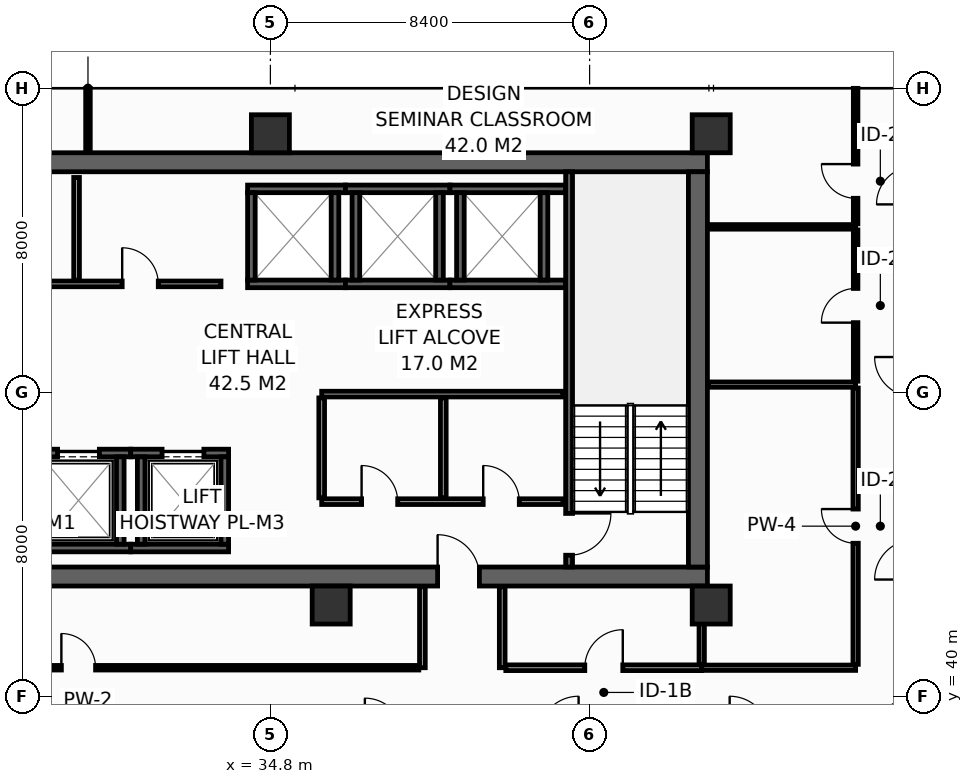
"""IFC4 building model, lengths in metres.
Left out: names, types, materials, properties, quantities, classifications, styles, units other than length and angle.
Written with IfcOpenShell. Run it as: python <this file> out.ifc"""

import sys

from ifc_helpers import new_model, si_unit, direction, frame, frame_2d, origin, origin_2d, place, context, subcontext, project, spatial, rectangle, hollow_rectangle, extrude, element, fill, save


model = new_model("IFC4")
c1 = context("Model", 3, precision=1e-05, world=origin(), true_north=direction((0.0, 1.0)))
c2 = subcontext(c1, "Body", "Model", "MODEL_VIEW")
j1 = project(units=[si_unit("LENGTHUNIT", "METRE"), si_unit("PLANEANGLEUNIT", "RADIAN")], contexts=[c1])
p1 = place(None, origin())
s1 = spatial("IfcSite", under=j1, at=p1, CompositionType="ELEMENT")
p2 = place(p1, origin())
s2 = spatial("IfcBuilding", under=s1, at=p2, CompositionType="ELEMENT")
p3 = place(p2, frame((0.0, 0.0, 167.6)))
s3 = spatial("IfcBuildingStorey", under=s2, at=p3, CompositionType="ELEMENT", Elevation=167.6)
p4 = place(p3, frame((13.6, 43.15, 0.0), z_axis=(0.0, 0.0, 1.0), x_axis=(1.0, 0.0, 0.0)))
e1 = element("IfcWall", 1, at=p4, inside=s3, PredefinedType="SHEAR", context=c2, shape_type="SweptSolid", body=[
    extrude(rectangle(XDim=32.7, YDim=0.5, at=frame_2d((16.35, 0.0))), origin(), (0.0, 0.0, 1.0), 3.55),
])
p5 = place(p4, frame((5.4, 0.0, 0.0)))
e2 = element("IfcOpeningElement", 2, at=p5, cuts=e1, PredefinedType="OPENING", context=c2, shape_type="SweptSolid", body=[
    extrude(rectangle(XDim=1.1, YDim=2.15, at=frame_2d((0.55, 1.075))), frame((0.0, 0.26, 0.0), z_axis=(0.0, -1.0, 0.0), x_axis=(1.0, 0.0, 0.0)), (0.0, 0.0, 1.0), 0.52),
])
p6 = place(p4, frame((25.6, 0.0, 0.0)))
e3 = element("IfcOpeningElement", 3, at=p6, cuts=e1, PredefinedType="OPENING", context=c2, shape_type="SweptSolid", body=[
    extrude(rectangle(XDim=1.1, YDim=2.15, at=frame_2d((0.55, 1.075))), frame((0.0, 0.26, 0.0), z_axis=(0.0, -1.0, 0.0), x_axis=(1.0, 0.0, 0.0)), (0.0, 0.0, 1.0), 0.52),
])
p7 = place(p3, frame((13.6, 54.05, 0.0), z_axis=(0.0, 0.0, 1.0), x_axis=(1.0, 0.0, 0.0)))
e4 = element("IfcWall", 4, at=p7, inside=s3, PredefinedType="SHEAR", context=c2, shape_type="SweptSolid", body=[
    extrude(rectangle(XDim=32.7, YDim=0.5, at=frame_2d((16.35, 0.0))), origin(), (0.0, 0.0, 1.0), 3.55),
])
p8 = place(p3, frame((46.05, 43.4, 0.0), z_axis=(0.0, 0.0, 1.0), x_axis=(0.0, 1.0, 0.0)))
e5 = element("IfcWall", 5, at=p8, inside=s3, PredefinedType="SHEAR", context=c2, shape_type="SweptSolid", body=[
    extrude(rectangle(XDim=10.4, YDim=0.5, at=frame_2d((5.2, 0.0))), origin(), (0.0, 0.0, 1.0), 3.55),
])
for number, where, z_axis, x_axis in (
    (6, (34.8, 54.8, 0.0), (0.0, 0.0, 1.0), (1.0, 0.0, 0.0)),
    (7, (46.4, 54.8, 0.0), (0.0, 0.0, 1.0), (1.0, 0.0, 0.0)),
    (8, (36.4, 42.4, 0.0), (0.0, 0.0, 1.0), (1.0, 0.0, 0.0)),
    (9, (46.4, 42.4, 0.0), (0.0, 0.0, 1.0), (1.0, 0.0, 0.0)),
):
    element("IfcColumn", number, at=place(p3, frame(where, z_axis=z_axis, x_axis=x_axis)), inside=s3, PredefinedType="COLUMN", context=c2, shape_type="SweptSolid", body=[
        extrude(hollow_rectangle(XDim=1.0, YDim=1.0, WallThickness=0.045, at=origin_2d()), origin(), (0.0, 0.0, 1.0), 3.8),
    ])
p9 = place(p3, frame((28.375, 43.9, 0.0), z_axis=(0.0, 0.0, 1.0), x_axis=(1.0, 0.0, 0.0)))
e10 = element("IfcWall", 10, at=p9, inside=s3, PredefinedType="SHEAR", context=c2, shape_type="SweptSolid", body=[
    extrude(rectangle(XDim=2.75, YDim=0.2, at=frame_2d((1.375, 0.0))), origin(), (0.0, 0.0, 1.0), 3.55),
])
p10 = place(p3, frame((28.375, 46.4, 0.0), z_axis=(0.0, 0.0, 1.0), x_axis=(1.0, 0.0, 0.0)))
e11 = element("IfcWall", 11, at=p10, inside=s3, PredefinedType="SHEAR", context=c2, shape_type="SweptSolid", body=[
    extrude(rectangle(XDim=2.75, YDim=0.2, at=frame_2d((1.375, 0.0))), origin(), (0.0, 0.0, 1.0), 3.55),
])
p11 = place(p10, frame((0.825, 0.0, 0.0)))
e12 = element("IfcOpeningElement", 12, at=p11, cuts=e11, PredefinedType="OPENING", context=c2, shape_type="SweptSolid", body=[
    extrude(rectangle(XDim=1.1, YDim=2.2, at=frame_2d((0.55, 1.1))), frame((0.0, 0.11, 0.0), z_axis=(0.0, -1.0, 0.0), x_axis=(1.0, 0.0, 0.0)), (0.0, 0.0, 1.0), 0.22),
])
p12 = place(p3, frame((30.85, 44.0, 0.0), z_axis=(0.0, 0.0, 1.0), x_axis=(0.0, 1.0, 0.0)))
e13 = element("IfcWall", 13, at=p12, inside=s3, PredefinedType="SHEAR", context=c2, shape_type="SweptSolid", body=[
    extrude(rectangle(XDim=2.3, YDim=0.2, at=frame_2d((1.15, 0.0))), origin(), (0.0, 0.0, 1.0), 3.55),
])
p13 = place(p3, frame((31.125, 43.9, 0.0), z_axis=(0.0, 0.0, 1.0), x_axis=(1.0, 0.0, 0.0)))
e14 = element("IfcWall", 14, at=p13, inside=s3, PredefinedType="SHEAR", context=c2, shape_type="SweptSolid", body=[
    extrude(rectangle(XDim=2.575, YDim=0.2, at=frame_2d((1.288, 0.0))), origin(), (0.0, 0.0, 1.0), 3.55),
])
p14 = place(p3, frame((31.125, 46.4, 0.0), z_axis=(0.0, 0.0, 1.0), x_axis=(1.0, 0.0, 0.0)))
e15 = element("IfcWall", 15, at=p14, inside=s3, PredefinedType="SHEAR", context=c2, shape_type="SweptSolid", body=[
    extrude(rectangle(XDim=2.575, YDim=0.2, at=frame_2d((1.288, 0.0))), origin(), (0.0, 0.0, 1.0), 3.55),
])
p15 = place(p14, frame((0.825, 0.0, 0.0)))
e16 = element("IfcOpeningElement", 16, at=p15, cuts=e15, PredefinedType="OPENING", context=c2, shape_type="SweptSolid", body=[
    extrude(rectangle(XDim=1.1, YDim=2.2, at=frame_2d((0.55, 1.1))), frame((0.0, 0.11, 0.0), z_axis=(0.0, -1.0, 0.0), x_axis=(1.0, 0.0, 0.0)), (0.0, 0.0, 1.0), 0.22),
])
for number, where, z_axis, x_axis in (
    (17, (31.4, 44.0, 0.0), (0.0, 0.0, 1.0), (0.0, 1.0, 0.0)),
    (18, (33.6, 44.0, 0.0), (0.0, 0.0, 1.0), (0.0, 1.0, 0.0)),
):
    element("IfcWall", number, at=place(p3, frame(where, z_axis=z_axis, x_axis=x_axis)), inside=s3, PredefinedType="SHEAR", context=c2, shape_type="SweptSolid", body=[
        extrude(rectangle(XDim=2.3, YDim=0.2, at=frame_2d((1.15, 0.0))), origin(), (0.0, 0.0, 1.0), 3.55),
    ])
for number, where, z_axis, x_axis in (
    (19, (34.2, 50.85, 0.0), (0.0, 0.0, 1.0), (1.0, 0.0, 0.0)),
    (20, (34.2, 53.35, 0.0), (0.0, 0.0, 1.0), (1.0, 0.0, 0.0)),
):
    element("IfcWall", number, at=place(p3, frame(where, z_axis=z_axis, x_axis=x_axis)), inside=s3, PredefinedType="SHEAR", context=c2, shape_type="SweptSolid", body=[
        extrude(rectangle(XDim=2.575, YDim=0.2, at=frame_2d((1.288, 0.0))), origin(), (0.0, 0.0, 1.0), 3.55),
    ])
for number, where, z_axis, x_axis in (
    (21, (34.3, 50.95, 0.0), (0.0, 0.0, 1.0), (0.0, 1.0, 0.0)),
    (22, (36.5, 50.95, 0.0), (0.0, 0.0, 1.0), (0.0, 1.0, 0.0)),
):
    element("IfcWall", number, at=place(p3, frame(where, z_axis=z_axis, x_axis=x_axis)), inside=s3, PredefinedType="SHEAR", context=c2, shape_type="SweptSolid", body=[
        extrude(rectangle(XDim=2.3, YDim=0.2, at=frame_2d((1.15, 0.0))), origin(), (0.0, 0.0, 1.0), 3.55),
    ])
for number, where, z_axis, x_axis in (
    (23, (36.775, 50.85, 0.0), (0.0, 0.0, 1.0), (1.0, 0.0, 0.0)),
    (24, (36.775, 53.35, 0.0), (0.0, 0.0, 1.0), (1.0, 0.0, 0.0)),
):
    element("IfcWall", number, at=place(p3, frame(where, z_axis=z_axis, x_axis=x_axis)), inside=s3, PredefinedType="SHEAR", context=c2, shape_type="SweptSolid", body=[
        extrude(rectangle(XDim=2.75, YDim=0.2, at=frame_2d((1.375, 0.0))), origin(), (0.0, 0.0, 1.0), 3.55),
    ])
for number, where, z_axis, x_axis in (
    (25, (37.05, 50.95, 0.0), (0.0, 0.0, 1.0), (0.0, 1.0, 0.0)),
    (26, (39.25, 50.95, 0.0), (0.0, 0.0, 1.0), (0.0, 1.0, 0.0)),
):
    element("IfcWall", number, at=place(p3, frame(where, z_axis=z_axis, x_axis=x_axis)), inside=s3, PredefinedType="SHEAR", context=c2, shape_type="SweptSolid", body=[
        extrude(rectangle(XDim=2.3, YDim=0.2, at=frame_2d((1.15, 0.0))), origin(), (0.0, 0.0, 1.0), 3.55),
    ])
for number, where, z_axis, x_axis in (
    (27, (39.525, 50.85, 0.0), (0.0, 0.0, 1.0), (1.0, 0.0, 0.0)),
    (28, (39.525, 53.35, 0.0), (0.0, 0.0, 1.0), (1.0, 0.0, 0.0)),
):
    element("IfcWall", number, at=place(p3, frame(where, z_axis=z_axis, x_axis=x_axis)), inside=s3, PredefinedType="SHEAR", context=c2, shape_type="SweptSolid", body=[
        extrude(rectangle(XDim=3.045, YDim=0.2, at=frame_2d((1.522, 0.0))), origin(), (0.0, 0.0, 1.0), 3.55),
    ])
for number, where, z_axis, x_axis in (
    (29, (39.8, 50.95, 0.0), (0.0, 0.0, 1.0), (0.0, 1.0, 0.0)),
    (30, (42.0, 50.95, 0.0), (0.0, 0.0, 1.0), (0.0, 1.0, 0.0)),
):
    element("IfcWall", number, at=place(p3, frame(where, z_axis=z_axis, x_axis=x_axis)), inside=s3, PredefinedType="SHEAR", context=c2, shape_type="SweptSolid", body=[
        extrude(rectangle(XDim=2.3, YDim=0.2, at=frame_2d((1.15, 0.0))), origin(), (0.0, 0.0, 1.0), 3.55),
    ])
p16 = place(p3, frame((42.66, 53.8, 0.0), z_axis=(0.0, 0.0, 1.0), x_axis=(0.0, -1.0, 0.0)))
e31 = element("IfcWall", 31, at=p16, inside=s3, PredefinedType="SHEAR", context=c2, shape_type="SweptSolid", body=[
    extrude(rectangle(XDim=10.4, YDim=0.18, at=frame_2d((5.2, 0.0))), origin(), (0.0, 0.0, 1.0), 3.55),
])
p17 = place(p16, frame((8.99, 0.0, 0.0)))
e32 = element("IfcOpeningElement", 32, at=p17, cuts=e31, PredefinedType="OPENING", context=c2, shape_type="SweptSolid", body=[
    extrude(rectangle(XDim=1.1, YDim=2.15, at=frame_2d((0.55, 1.075))), frame((0.0, 0.1, 0.0), z_axis=(0.0, -1.0, 0.0), x_axis=(1.0, 0.0, 0.0)), (0.0, 0.0, 1.0), 0.2),
])
p18 = place(p3, frame((36.15, 45.12, 0.0), z_axis=(0.0, 0.0, 1.0), x_axis=(1.0, 0.0, 0.0)))
e33 = element("IfcWall", 33, at=p18, inside=s3, PredefinedType="PARTITIONING", context=c2, shape_type="SweptSolid", body=[
    extrude(rectangle(XDim=6.35, YDim=0.15, at=frame_2d((3.175, 0.0))), origin(), (0.0, 0.0, 1.0), 3.55),
])
p19 = place(p18, frame((1.05, 0.0, 0.0)))
e34 = element("IfcOpeningElement", 34, at=p19, cuts=e33, PredefinedType="OPENING", context=c2, shape_type="SweptSolid", body=[
    extrude(rectangle(XDim=0.95, YDim=2.15, at=frame_2d((0.475, 1.075))), frame((0.0, 0.085, 0.0), z_axis=(0.0, -1.0, 0.0), x_axis=(1.0, 0.0, 0.0)), (0.0, 0.0, 1.0), 0.17),
])
p20 = place(p18, frame((4.25, 0.0, 0.0)))
e35 = element("IfcOpeningElement", 35, at=p20, cuts=e33, PredefinedType="OPENING", context=c2, shape_type="SweptSolid", body=[
    extrude(rectangle(XDim=0.95, YDim=2.15, at=frame_2d((0.475, 1.075))), frame((0.0, 0.085, 0.0), z_axis=(0.0, -1.0, 0.0), x_axis=(1.0, 0.0, 0.0)), (0.0, 0.0, 1.0), 0.17),
])
p21 = place(p3, frame((36.15, 47.95, 0.0), z_axis=(0.0, 0.0, 1.0), x_axis=(1.0, 0.0, 0.0)))
e36 = element("IfcWall", 36, at=p21, inside=s3, PredefinedType="PARTITIONING", context=c2, shape_type="SweptSolid", body=[
    extrude(rectangle(XDim=6.35, YDim=0.15, at=frame_2d((3.175, 0.0))), origin(), (0.0, 0.0, 1.0), 3.55),
])
for number, where, z_axis, x_axis in (
    (37, (36.15, 45.22, 0.0), (0.0, 0.0, 1.0), (0.0, 1.0, 0.0)),
    (38, (39.35, 45.22, 0.0), (0.0, 0.0, 1.0), (0.0, 1.0, 0.0)),
):
    element("IfcWall", number, at=place(p3, frame(where, z_axis=z_axis, x_axis=x_axis)), inside=s3, PredefinedType="PARTITIONING", context=c2, shape_type="SweptSolid", body=[
        extrude(rectangle(XDim=2.63, YDim=0.15, at=frame_2d((1.315, 0.0))), origin(), (0.0, 0.0, 1.0), 3.55),
    ])
p22 = place(p3, frame((25.85, 50.85, 0.0), z_axis=(0.0, 0.0, 1.0), x_axis=(1.0, 0.0, 0.0)))
e39 = element("IfcWall", 39, at=p22, inside=s3, PredefinedType="PARTITIONING", context=c2, shape_type="SweptSolid", body=[
    extrude(rectangle(XDim=7.65, YDim=0.15, at=frame_2d((3.825, 0.0))), origin(), (0.0, 0.0, 1.0), 3.55),
])
p23 = place(p22, frame((1.25, 0.0, 0.0)))
e40 = element("IfcOpeningElement", 40, at=p23, cuts=e39, PredefinedType="OPENING", context=c2, shape_type="SweptSolid", body=[
    extrude(rectangle(XDim=0.95, YDim=2.15, at=frame_2d((0.475, 1.075))), frame((0.0, 0.085, 0.0), z_axis=(0.0, -1.0, 0.0), x_axis=(1.0, 0.0, 0.0)), (0.0, 0.0, 1.0), 0.17),
])
p24 = place(p22, frame((5.05, 0.0, 0.0)))
e41 = element("IfcOpeningElement", 41, at=p24, cuts=e39, PredefinedType="OPENING", context=c2, shape_type="SweptSolid", body=[
    extrude(rectangle(XDim=0.95, YDim=2.15, at=frame_2d((0.475, 1.075))), frame((0.0, 0.085, 0.0), z_axis=(0.0, -1.0, 0.0), x_axis=(1.0, 0.0, 0.0)), (0.0, 0.0, 1.0), 0.17),
])
p25 = place(p3, frame((29.7, 50.95, 0.0), z_axis=(0.0, 0.0, 1.0), x_axis=(0.0, 1.0, 0.0)))
e42 = element("IfcWall", 42, at=p25, inside=s3, PredefinedType="PARTITIONING", context=c2, shape_type="SweptSolid", body=[
    extrude(rectangle(XDim=2.7, YDim=0.15, at=frame_2d((1.35, 0.0))), origin(), (0.0, 0.0, 1.0), 3.55),
])
p26 = place(p3, frame((46.15, 40.75, 0.0), z_axis=(0.0, 0.0, 1.0), x_axis=(1.0, 0.0, 0.0)))
e43 = element("IfcWall", 43, at=p26, inside=s3, PredefinedType="PARTITIONING", context=c2, shape_type="SweptSolid", body=[
    extrude(rectangle(XDim=4.05, YDim=0.14, at=frame_2d((2.025, 0.0))), origin(), (0.0, 0.0, 1.0), 3.55),
])
p27 = place(p3, frame((46.15, 40.84, 0.0), z_axis=(0.0, 0.0, 1.0), x_axis=(0.0, 1.0, 0.0)))
e44 = element("IfcWall", 44, at=p27, inside=s3, PredefinedType="PARTITIONING", context=c2, shape_type="SweptSolid", body=[
    extrude(rectangle(XDim=2.04, YDim=0.14, at=frame_2d((1.02, 0.0))), origin(), (0.0, 0.0, 1.0), 3.55),
])
p28 = place(p3, frame((46.32, 48.2, 0.0), z_axis=(0.0, 0.0, 1.0), x_axis=(1.0, 0.0, 0.0)))
e45 = element("IfcWall", 45, at=p28, inside=s3, PredefinedType="PARTITIONING", context=c2, shape_type="SweptSolid", body=[
    extrude(rectangle(XDim=3.88, YDim=0.14, at=frame_2d((1.94, 0.0))), origin(), (0.0, 0.0, 1.0), 3.55),
])
p29 = place(p3, frame((50.2, 40.84, 0.0), z_axis=(0.0, 0.0, 1.0), x_axis=(0.0, 1.0, 0.0)))
e46 = element("IfcWall", 46, at=p29, inside=s3, PredefinedType="PARTITIONING", context=c2, shape_type="SweptSolid", body=[
    extrude(rectangle(XDim=7.27, YDim=0.14, at=frame_2d((3.635, 0.0))), origin(), (0.0, 0.0, 1.0), 2.835),
])
p30 = place(p29, frame((3.185, 0.0, 0.0)))
e47 = element("IfcOpeningElement", 47, at=p30, cuts=e46, PredefinedType="OPENING", context=c2, shape_type="SweptSolid", body=[
    extrude(rectangle(XDim=0.9, YDim=2.1, at=frame_2d((0.45, 1.05))), frame((0.0, 0.08, 0.0), z_axis=(0.0, -1.0, 0.0), x_axis=(1.0, 0.0, 0.0)), (0.0, 0.0, 1.0), 0.16),
])
p31 = place(p3, frame((46.32, 52.35, 0.0), z_axis=(0.0, 0.0, 1.0), x_axis=(1.0, 0.0, 0.0)))
e48 = element("IfcWall", 48, at=p31, inside=s3, PredefinedType="PARTITIONING", context=c2, shape_type="SweptSolid", body=[
    extrude(rectangle(XDim=3.88, YDim=0.12, at=frame_2d((1.94, 0.0))), origin(), (0.0, 0.0, 1.0), 3.55),
])
p32 = place(p3, frame((30.0, 54.32, 0.0), z_axis=(0.0, 0.0, 1.0), x_axis=(0.0, 1.0, 0.0)))
e49 = element("IfcWall", 49, at=p32, inside=s3, PredefinedType="PARTITIONING", context=c2, shape_type="SweptSolid", body=[
    extrude(rectangle(XDim=1.675, YDim=0.12, at=frame_2d((0.837, 0.0))), origin(), (0.0, 0.0, 1.0), 2.935),
])
p33 = place(p3, frame((50.2, 48.29, 0.0), z_axis=(0.0, 0.0, 1.0), x_axis=(0.0, 1.0, 0.0)))
e50 = element("IfcWall", 50, at=p33, inside=s3, PredefinedType="PARTITIONING", context=c2, shape_type="SweptSolid", body=[
    extrude(rectangle(XDim=3.98, YDim=0.12, at=frame_2d((1.99, 0.0))), origin(), (0.0, 0.0, 1.0), 3.55),
])
p34 = place(p33, frame((1.54, 0.0, 0.0)))
e51 = element("IfcOpeningElement", 51, at=p34, cuts=e50, PredefinedType="OPENING", context=c2, shape_type="SweptSolid", body=[
    extrude(rectangle(XDim=0.9, YDim=2.1, at=frame_2d((0.45, 1.05))), frame((0.0, 0.07, 0.0), z_axis=(0.0, -1.0, 0.0), x_axis=(1.0, 0.0, 0.0)), (0.0, 0.0, 1.0), 0.14),
])
p35 = place(p3, frame((50.2, 52.43, 0.0), z_axis=(0.0, 0.0, 1.0), x_axis=(0.0, 1.0, 0.0)))
e52 = element("IfcWall", 52, at=p35, inside=s3, PredefinedType="PARTITIONING", context=c2, shape_type="SweptSolid", body=[
    extrude(rectangle(XDim=3.565, YDim=0.12, at=frame_2d((1.783, 0.0))), origin(), (0.0, 0.0, 1.0), 2.935),
])
p36 = place(p35, frame((0.672, 0.0, 0.0)))
e53 = element("IfcOpeningElement", 53, at=p36, cuts=e52, PredefinedType="OPENING", context=c2, shape_type="SweptSolid", body=[
    extrude(rectangle(XDim=0.9, YDim=2.1, at=frame_2d((0.45, 1.05))), frame((0.0, 0.07, 0.0), z_axis=(0.0, -1.0, 0.0), x_axis=(1.0, 0.0, 0.0)), (0.0, 0.0, 1.0), 0.14),
])
for number, where, z_axis, x_axis in (
    (54, (38.8, 40.75, 0.0), (0.0, 0.0, 1.0), (0.0, 1.0, 0.0)),
    (55, (40.9, 40.75, 0.0), (0.0, 0.0, 1.0), (0.0, 1.0, 0.0)),
):
    element("IfcWall", number, at=place(p3, frame(where, z_axis=z_axis, x_axis=x_axis)), inside=s3, PredefinedType="PARTITIONING", context=c2, shape_type="SweptSolid", body=[
        extrude(rectangle(XDim=2.13, YDim=0.15, at=frame_2d((1.065, 0.0))), origin(), (0.0, 0.0, 1.0), 3.55),
    ])
p37 = place(p3, frame((20.795, 40.75, 0.0), z_axis=(0.0, 0.0, 1.0), x_axis=(1.0, 0.0, 0.0)))
e56 = element("IfcWall", 56, at=p37, inside=s3, PredefinedType="PARTITIONING", context=c2, shape_type="SweptSolid", body=[
    extrude(rectangle(XDim=17.91, YDim=0.12, at=frame_2d((8.955, 0.0))), origin(), (0.0, 0.0, 1.0), 2.835),
])
p38 = place(p37, frame((8.505, 0.0, 0.0)))
e57 = element("IfcOpeningElement", 57, at=p38, cuts=e56, PredefinedType="OPENING", context=c2, shape_type="SweptSolid", body=[
    extrude(rectangle(XDim=0.9, YDim=2.1, at=frame_2d((0.45, 1.05))), frame((0.0, 0.07, 0.0), z_axis=(0.0, -1.0, 0.0), x_axis=(1.0, 0.0, 0.0)), (0.0, 0.0, 1.0), 0.14),
])
p39 = place(p3, frame((40.995, 40.75, 0.0), z_axis=(0.0, 0.0, 1.0), x_axis=(1.0, 0.0, 0.0)))
e58 = element("IfcWall", 58, at=p39, inside=s3, PredefinedType="PARTITIONING", context=c2, shape_type="SweptSolid", body=[
    extrude(rectangle(XDim=5.155, YDim=0.15, at=frame_2d((2.577, 0.0))), origin(), (0.0, 0.0, 1.0), 3.55),
])
p40 = place(p39, frame((2.078, 0.0, 0.0)))
e59 = element("IfcOpeningElement", 59, at=p40, cuts=e58, PredefinedType="OPENING", context=c2, shape_type="SweptSolid", body=[
    extrude(rectangle(XDim=1.0, YDim=2.15, at=frame_2d((0.5, 1.075))), frame((0.0, 0.085, 0.0), z_axis=(0.0, -1.0, 0.0), x_axis=(1.0, 0.0, 0.0)), (0.0, 0.0, 1.0), 0.17),
])
p41 = place(p11, origin())
e60 = element("IfcDoor", 60, at=p41, inside=s3, OperationType="SLIDING_TO_LEFT", PredefinedType="DOOR", context=c2, shape_type="SweptSolid", body=[
    extrude(rectangle(XDim=1.1, YDim=2.2, at=frame_2d((0.55, 1.1))), frame((0.0, 0.025, 0.0), z_axis=(0.0, -1.0, 0.0), x_axis=(1.0, 0.0, 0.0)), (0.0, 0.0, 1.0), 0.05),
])
fill(e12, e60)
p42 = place(p15, origin())
e61 = element("IfcDoor", 61, at=p42, inside=s3, OperationType="SLIDING_TO_LEFT", PredefinedType="DOOR", context=c2, shape_type="SweptSolid", body=[
    extrude(rectangle(XDim=1.1, YDim=2.2, at=frame_2d((0.55, 1.1))), frame((0.0, 0.025, 0.0), z_axis=(0.0, -1.0, 0.0), x_axis=(1.0, 0.0, 0.0)), (0.0, 0.0, 1.0), 0.05),
])
fill(e16, e61)
p43 = place(p17, origin())
e62 = element("IfcDoor", 62, at=p43, inside=s3, OperationType="SINGLE_SWING_LEFT", PredefinedType="DOOR", context=c2, shape_type="SweptSolid", body=[
    extrude(rectangle(XDim=1.1, YDim=2.15, at=frame_2d((0.55, 1.075))), frame((0.0, 0.025, 0.0), z_axis=(0.0, -1.0, 0.0), x_axis=(1.0, 0.0, 0.0)), (0.0, 0.0, 1.0), 0.05),
])
fill(e32, e62)
p44 = place(p6, origin())
e63 = element("IfcDoor", 63, at=p44, inside=s3, OperationType="SINGLE_SWING_LEFT", PredefinedType="DOOR", context=c2, shape_type="SweptSolid", body=[
    extrude(rectangle(XDim=1.1, YDim=2.15, at=frame_2d((0.55, 1.075))), frame((0.0, 0.025, 0.0), z_axis=(0.0, -1.0, 0.0), x_axis=(1.0, 0.0, 0.0)), (0.0, 0.0, 1.0), 0.05),
])
fill(e3, e63)
p45 = place(p19, origin())
e64 = element("IfcDoor", 64, at=p45, inside=s3, OperationType="SINGLE_SWING_LEFT", PredefinedType="DOOR", context=c2, shape_type="SweptSolid", body=[
    extrude(rectangle(XDim=0.95, YDim=2.15, at=frame_2d((0.475, 1.075))), frame((0.0, 0.025, 0.0), z_axis=(0.0, -1.0, 0.0), x_axis=(1.0, 0.0, 0.0)), (0.0, 0.0, 1.0), 0.05),
])
fill(e34, e64)
p46 = place(p20, origin())
e65 = element("IfcDoor", 65, at=p46, inside=s3, OperationType="SINGLE_SWING_LEFT", PredefinedType="DOOR", context=c2, shape_type="SweptSolid", body=[
    extrude(rectangle(XDim=0.95, YDim=2.15, at=frame_2d((0.475, 1.075))), frame((0.0, 0.025, 0.0), z_axis=(0.0, -1.0, 0.0), x_axis=(1.0, 0.0, 0.0)), (0.0, 0.0, 1.0), 0.05),
])
fill(e35, e65)
p47 = place(p24, origin())
e66 = element("IfcDoor", 66, at=p47, inside=s3, OperationType="SINGLE_SWING_LEFT", PredefinedType="DOOR", context=c2, shape_type="SweptSolid", body=[
    extrude(rectangle(XDim=0.95, YDim=2.15, at=frame_2d((0.475, 1.075))), frame((0.0, 0.025, 0.0), z_axis=(0.0, -1.0, 0.0), x_axis=(1.0, 0.0, 0.0)), (0.0, 0.0, 1.0), 0.05),
])
fill(e41, e66)
p48 = place(p30, origin())
e67 = element("IfcDoor", 67, at=p48, inside=s3, OperationType="SINGLE_SWING_RIGHT", PredefinedType="DOOR", context=c2, shape_type="SweptSolid", body=[
    extrude(rectangle(XDim=0.9, YDim=2.1, at=frame_2d((0.45, 1.05))), frame((0.0, 0.025, 0.0), z_axis=(0.0, -1.0, 0.0), x_axis=(1.0, 0.0, 0.0)), (0.0, 0.0, 1.0), 0.05),
])
fill(e47, e67)
p49 = place(p34, origin())
e68 = element("IfcDoor", 68, at=p49, inside=s3, OperationType="SINGLE_SWING_LEFT", PredefinedType="DOOR", context=c2, shape_type="SweptSolid", body=[
    extrude(rectangle(XDim=0.9, YDim=2.1, at=frame_2d((0.45, 1.05))), frame((0.0, 0.025, 0.0), z_axis=(0.0, -1.0, 0.0), x_axis=(1.0, 0.0, 0.0)), (0.0, 0.0, 1.0), 0.05),
])
fill(e51, e68)
p50 = place(p36, origin())
e69 = element("IfcDoor", 69, at=p50, inside=s3, OperationType="SINGLE_SWING_RIGHT", PredefinedType="DOOR", context=c2, shape_type="SweptSolid", body=[
    extrude(rectangle(XDim=0.9, YDim=2.1, at=frame_2d((0.45, 1.05))), frame((0.0, 0.025, 0.0), z_axis=(0.0, -1.0, 0.0), x_axis=(1.0, 0.0, 0.0)), (0.0, 0.0, 1.0), 0.05),
])
fill(e53, e69)
p51 = place(p38, origin())
e70 = element("IfcDoor", 70, at=p51, inside=s3, OperationType="SINGLE_SWING_LEFT", PredefinedType="DOOR", context=c2, shape_type="SweptSolid", body=[
    extrude(rectangle(XDim=0.9, YDim=2.1, at=frame_2d((0.45, 1.05))), frame((0.0, 0.025, 0.0), z_axis=(0.0, -1.0, 0.0), x_axis=(1.0, 0.0, 0.0)), (0.0, 0.0, 1.0), 0.05),
])
fill(e57, e70)
p52 = place(p40, origin())
e71 = element("IfcDoor", 71, at=p52, inside=s3, OperationType="SINGLE_SWING_RIGHT", PredefinedType="DOOR", context=c2, shape_type="SweptSolid", body=[
    extrude(rectangle(XDim=1.0, YDim=2.15, at=frame_2d((0.5, 1.075))), frame((0.0, 0.025, 0.0), z_axis=(0.0, -1.0, 0.0), x_axis=(1.0, 0.0, 0.0)), (0.0, 0.0, 1.0), 0.05),
])
fill(e59, e71)
save(model, sys.argv[1])
